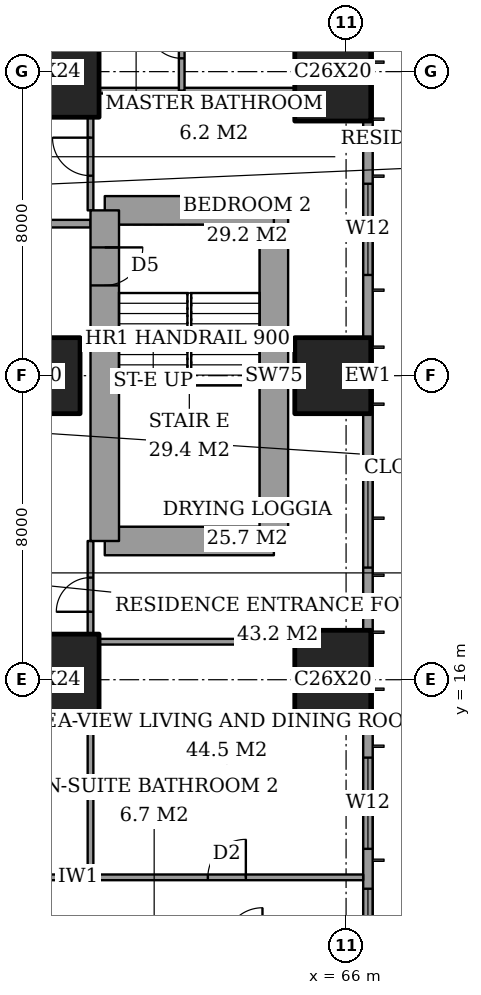
"""IFC4 building model, lengths in metres.
Left out: names, types, materials, properties, quantities, classifications, styles, units other than length and angle.
Written with IfcOpenShell. Run it as: python <this file> out.ifc"""

import sys

from ifc_helpers import new_model, si_unit, direction, frame, frame_2d, origin, origin_2d, place, context, subcontext, project, spatial, rectangle, extrude, element, fill, save


model = new_model("IFC4")
c1 = context("Model", 3, precision=1e-05, world=origin(), true_north=direction((0.0, 1.0)))
c2 = subcontext(c1, "Body", "Model", "MODEL_VIEW")
j1 = project(units=[si_unit("LENGTHUNIT", "METRE"), si_unit("PLANEANGLEUNIT", "RADIAN")], contexts=[c1])
p1 = place(None, origin())
s1 = spatial("IfcSite", under=j1, at=p1, CompositionType="ELEMENT")
p2 = place(p1, origin())
s2 = spatial("IfcBuilding", under=s1, at=p2, CompositionType="ELEMENT")
p3 = place(p2, frame((0.0, 0.0, 125.0)))
s3 = spatial("IfcBuildingStorey", under=s2, at=p3, CompositionType="ELEMENT", Elevation=125.0)
p4 = place(p3, frame((58.0, 16.0, 0.0), z_axis=(0.0, 0.0, 1.0), x_axis=(1.0, 0.0, 0.0)))
e1 = element("IfcColumn", 1, at=p4, inside=s3, PredefinedType="COLUMN", context=c2, shape_type="SweptSolid", body=[
    extrude(rectangle(XDim=3.0, YDim=2.4, at=origin_2d()), origin(), (0.0, 0.0, 1.0), 3.6),
])
p5 = place(p3, frame((58.0, 24.0, 0.0), z_axis=(0.0, 0.0, 1.0), x_axis=(1.0, 0.0, 0.0)))
e2 = element("IfcColumn", 2, at=p5, inside=s3, PredefinedType="COLUMN", context=c2, shape_type="SweptSolid", body=[
    extrude(rectangle(XDim=2.0, YDim=2.0, at=origin_2d()), origin(), (0.0, 0.0, 1.0), 3.6),
])
p6 = place(p3, frame((58.0, 32.0, 0.0), z_axis=(0.0, 0.0, 1.0), x_axis=(1.0, 0.0, 0.0)))
e3 = element("IfcColumn", 3, at=p6, inside=s3, PredefinedType="COLUMN", context=c2, shape_type="SweptSolid", body=[
    extrude(rectangle(XDim=3.0, YDim=2.4, at=origin_2d()), origin(), (0.0, 0.0, 1.0), 3.6),
])
p7 = place(p3, frame((65.65, 16.0, 0.0), z_axis=(0.0, 0.0, 1.0), x_axis=(0.0, 1.0, 0.0)))
e4 = element("IfcColumn", 4, at=p7, inside=s3, PredefinedType="COLUMN", context=c2, shape_type="SweptSolid", body=[
    extrude(rectangle(XDim=2.6, YDim=2.0, at=origin_2d()), origin(), (0.0, 0.0, 1.0), 3.6),
])
p8 = place(p3, frame((65.65, 24.0, 0.0), z_axis=(0.0, 0.0, 1.0), x_axis=(1.0, 0.0, 0.0)))
e5 = element("IfcColumn", 5, at=p8, inside=s3, PredefinedType="COLUMN", context=c2, shape_type="SweptSolid", body=[
    extrude(rectangle(XDim=2.0, YDim=2.0, at=origin_2d()), origin(), (0.0, 0.0, 1.0), 3.6),
])
p9 = place(p3, frame((65.65, 32.0, 0.0), z_axis=(0.0, 0.0, 1.0), x_axis=(0.0, 1.0, 0.0)))
e6 = element("IfcColumn", 6, at=p9, inside=s3, PredefinedType="COLUMN", context=c2, shape_type="SweptSolid", body=[
    extrude(rectangle(XDim=2.6, YDim=2.0, at=origin_2d()), origin(), (0.0, 0.0, 1.0), 3.6),
])
p10 = place(p3, frame((59.65, 19.65, 0.0), z_axis=(0.0, 0.0, 1.0), x_axis=(1.0, 0.0, 0.0)))
e7 = element("IfcWall", 7, at=p10, inside=s3, PredefinedType="SHEAR", context=c2, shape_type="SweptSolid", body=[
    extrude(rectangle(XDim=4.45, YDim=0.75, at=frame_2d((2.225, 0.0))), origin(), (0.0, 0.0, 1.0), 3.6),
])
p11 = place(p3, frame((64.1, 19.65, 0.0), z_axis=(0.0, 0.0, 1.0), x_axis=(0.0, 1.0, 0.0)))
e8 = element("IfcWall", 8, at=p11, inside=s3, PredefinedType="SHEAR", context=c2, shape_type="SweptSolid", body=[
    extrude(rectangle(XDim=8.7, YDim=0.75, at=frame_2d((4.35, 0.0))), origin(), (0.0, 0.0, 1.0), 3.6),
])
p12 = place(p3, frame((64.1, 28.35, 0.0), z_axis=(0.0, 0.0, 1.0), x_axis=(-1.0, 0.0, 0.0)))
e9 = element("IfcWall", 9, at=p12, inside=s3, PredefinedType="SHEAR", context=c2, shape_type="SweptSolid", body=[
    extrude(rectangle(XDim=4.45, YDim=0.75, at=frame_2d((2.225, 0.0))), origin(), (0.0, 0.0, 1.0), 3.6),
])
p13 = place(p3, frame((59.65, 28.35, 0.0), z_axis=(0.0, 0.0, 1.0), x_axis=(0.0, -1.0, 0.0)))
e10 = element("IfcWall", 10, at=p13, inside=s3, PredefinedType="SHEAR", context=c2, shape_type="SweptSolid", body=[
    extrude(rectangle(XDim=8.7, YDim=0.75, at=frame_2d((4.35, 0.0))), origin(), (0.0, 0.0, 1.0), 3.6),
])
p14 = place(p13, frame((0.975, 0.0, 0.0)))
e11 = element("IfcOpeningElement", 11, at=p14, cuts=e10, PredefinedType="OPENING", context=c2, shape_type="SweptSolid", body=[
    extrude(rectangle(XDim=1.0, YDim=2.1, at=frame_2d((0.5, 1.05))), frame((0.0, 0.385, 0.0), z_axis=(0.0, -1.0, 0.0), x_axis=(1.0, 0.0, 0.0)), (0.0, 0.0, 1.0), 0.77),
])
p15 = place(p3, frame((66.575, 3.175, 0.0), z_axis=(0.0, 0.0, 1.0), x_axis=(0.0, 1.0, 0.0)))
e12 = element("IfcWall", 12, at=p15, inside=s3, PredefinedType="SOLIDWALL", context=c2, shape_type="SweptSolid", body=[
    extrude(rectangle(XDim=41.65, YDim=0.25, at=frame_2d((20.825, 0.0))), origin(), (0.0, 0.0, 1.0), 3.6),
])
p16 = place(p15, frame((0.775, 0.0, 0.4)))
e13 = element("IfcOpeningElement", 13, at=p16, cuts=e12, PredefinedType="OPENING", context=c2, shape_type="SweptSolid", body=[
    extrude(rectangle(XDim=2.4, YDim=2.2, at=frame_2d((1.2, 1.1))), frame((0.0, 0.135, 0.0), z_axis=(0.0, -1.0, 0.0), x_axis=(1.0, 0.0, 0.0)), (0.0, 0.0, 1.0), 0.27),
])
p17 = place(p15, frame((6.125, 0.0, 0.4)))
e14 = element("IfcOpeningElement", 14, at=p17, cuts=e12, PredefinedType="OPENING", context=c2, shape_type="SweptSolid", body=[
    extrude(rectangle(XDim=1.2, YDim=2.2, at=frame_2d((0.6, 1.1))), frame((0.0, 0.135, 0.0), z_axis=(0.0, -1.0, 0.0), x_axis=(1.0, 0.0, 0.0)), (0.0, 0.0, 1.0), 0.27),
])
p18 = place(p15, frame((8.375, 0.0, 0.4)))
e15 = element("IfcOpeningElement", 15, at=p18, cuts=e12, PredefinedType="OPENING", context=c2, shape_type="SweptSolid", body=[
    extrude(rectangle(XDim=2.4, YDim=2.2, at=frame_2d((1.2, 1.1))), frame((0.0, 0.135, 0.0), z_axis=(0.0, -1.0, 0.0), x_axis=(1.0, 0.0, 0.0)), (0.0, 0.0, 1.0), 0.27),
])
p19 = place(p15, frame((15.775, 0.0, 0.4)))
e16 = element("IfcOpeningElement", 16, at=p19, cuts=e12, PredefinedType="OPENING", context=c2, shape_type="SweptSolid", body=[
    extrude(rectangle(XDim=2.4, YDim=2.2, at=frame_2d((1.2, 1.1))), frame((0.0, 0.135, 0.0), z_axis=(0.0, -1.0, 0.0), x_axis=(1.0, 0.0, 0.0)), (0.0, 0.0, 1.0), 0.27),
])
p20 = place(p15, frame((23.475, 0.0, 0.4)))
e17 = element("IfcOpeningElement", 17, at=p20, cuts=e12, PredefinedType="OPENING", context=c2, shape_type="SweptSolid", body=[
    extrude(rectangle(XDim=2.4, YDim=2.2, at=frame_2d((1.2, 1.1))), frame((0.0, 0.135, 0.0), z_axis=(0.0, -1.0, 0.0), x_axis=(1.0, 0.0, 0.0)), (0.0, 0.0, 1.0), 0.27),
])
p21 = place(p15, frame((30.975, 0.0, 0.4)))
e18 = element("IfcOpeningElement", 18, at=p21, cuts=e12, PredefinedType="OPENING", context=c2, shape_type="SweptSolid", body=[
    extrude(rectangle(XDim=2.4, YDim=2.2, at=frame_2d((1.2, 1.1))), frame((0.0, 0.135, 0.0), z_axis=(0.0, -1.0, 0.0), x_axis=(1.0, 0.0, 0.0)), (0.0, 0.0, 1.0), 0.27),
])
p22 = place(p15, frame((34.5, 0.0, 0.4)))
e19 = element("IfcOpeningElement", 19, at=p22, cuts=e12, PredefinedType="OPENING", context=c2, shape_type="SweptSolid", body=[
    extrude(rectangle(XDim=1.2, YDim=2.2, at=frame_2d((0.6, 1.1))), frame((0.0, 0.135, 0.0), z_axis=(0.0, -1.0, 0.0), x_axis=(1.0, 0.0, 0.0)), (0.0, 0.0, 1.0), 0.27),
])
p23 = place(p15, frame((38.475, 0.0, 0.4)))
e20 = element("IfcOpeningElement", 20, at=p23, cuts=e12, PredefinedType="OPENING", context=c2, shape_type="SweptSolid", body=[
    extrude(rectangle(XDim=2.4, YDim=2.2, at=frame_2d((1.2, 1.1))), frame((0.0, 0.135, 0.0), z_axis=(0.0, -1.0, 0.0), x_axis=(1.0, 0.0, 0.0)), (0.0, 0.0, 1.0), 0.27),
])
p24 = place(p3, frame((41.439, 10.8, 0.0), z_axis=(0.0, 0.0, 1.0), x_axis=(1.0, 0.0, 0.0)))
e21 = element("IfcWall", 21, at=p24, inside=s3, PredefinedType="PARTITIONING", context=c2, shape_type="SweptSolid", body=[
    extrude(rectangle(XDim=25.011, YDim=0.15, at=frame_2d((12.505, 0.0))), origin(), (0.0, 0.0, 1.0), 3.35),
])
p25 = place(p24, frame((12.361, 0.0, 0.0)))
e22 = element("IfcOpeningElement", 22, at=p25, cuts=e21, PredefinedType="OPENING", context=c2, shape_type="SweptSolid", body=[
    extrude(rectangle(XDim=1.0, YDim=2.1, at=frame_2d((0.5, 1.05))), frame((0.0, 0.085, 0.0), z_axis=(0.0, -1.0, 0.0), x_axis=(1.0, 0.0, 0.0)), (0.0, 0.0, 1.0), 0.17),
])
p26 = place(p24, frame((20.924, 0.0, 0.0)))
e23 = element("IfcOpeningElement", 23, at=p26, cuts=e21, PredefinedType="OPENING", context=c2, shape_type="SweptSolid", body=[
    extrude(rectangle(XDim=1.0, YDim=2.1, at=frame_2d((0.5, 1.05))), frame((0.0, 0.085, 0.0), z_axis=(0.0, -1.0, 0.0), x_axis=(1.0, 0.0, 0.0)), (0.0, 0.0, 1.0), 0.17),
])
p27 = place(p24, frame((15.448, 0.0, 0.0)))
e24 = element("IfcOpeningElement", 24, at=p27, cuts=e21, PredefinedType="OPENING", context=c2, shape_type="SweptSolid", body=[
    extrude(rectangle(XDim=0.9, YDim=2.1, at=frame_2d((0.45, 1.05))), frame((0.0, 0.085, 0.0), z_axis=(0.0, -1.0, 0.0), x_axis=(1.0, 0.0, 0.0)), (0.0, 0.0, 1.0), 0.17),
])
p28 = place(p24, frame((9.961, 0.0, 0.0)))
e25 = element("IfcOpeningElement", 25, at=p28, cuts=e21, PredefinedType="OPENING", context=c2, shape_type="SweptSolid", body=[
    extrude(rectangle(XDim=1.0, YDim=2.1, at=frame_2d((0.5, 1.05))), frame((0.0, 0.085, 0.0), z_axis=(0.0, -1.0, 0.0), x_axis=(1.0, 0.0, 0.0)), (0.0, 0.0, 1.0), 0.17),
])
p29 = place(p24, frame((7.361, 0.0, 0.0)))
e26 = element("IfcOpeningElement", 26, at=p29, cuts=e21, PredefinedType="OPENING", context=c2, shape_type="SweptSolid", body=[
    extrude(rectangle(XDim=1.0, YDim=2.1, at=frame_2d((0.5, 1.05))), frame((0.0, 0.085, 0.0), z_axis=(0.0, -1.0, 0.0), x_axis=(1.0, 0.0, 0.0)), (0.0, 0.0, 1.0), 0.17),
])
p30 = place(p24, frame((2.836, 0.0, 0.0)))
e27 = element("IfcOpeningElement", 27, at=p30, cuts=e21, PredefinedType="OPENING", context=c2, shape_type="SweptSolid", body=[
    extrude(rectangle(XDim=1.0, YDim=2.1, at=frame_2d((0.5, 1.05))), frame((0.0, 0.085, 0.0), z_axis=(0.0, -1.0, 0.0), x_axis=(1.0, 0.0, 0.0)), (0.0, 0.0, 1.0), 0.17),
])
p31 = place(p3, frame((59.5, 17.0, 0.0), z_axis=(0.0, 0.0, 1.0), x_axis=(1.0, 0.0, 0.0)))
e28 = element("IfcWall", 28, at=p31, inside=s3, PredefinedType="PARTITIONING", context=c2, shape_type="SweptSolid", body=[
    extrude(rectangle(XDim=5.15, YDim=0.15, at=frame_2d((2.575, 0.0))), origin(), (0.0, 0.0, 1.0), 3.35),
])
p32 = place(p3, frame((42.0, 28.0, 0.0), z_axis=(0.0, 0.0, 1.0), x_axis=(1.0, 0.0, 0.0)))
e29 = element("IfcWall", 29, at=p32, inside=s3, PredefinedType="PARTITIONING", context=c2, shape_type="SweptSolid", body=[
    extrude(rectangle(XDim=17.275, YDim=0.2, at=frame_2d((8.637, 0.0))), origin(), (0.0, 0.0, 1.0), 3.35),
])
p33 = place(p32, frame((9.5, 0.0, 0.0)))
e30 = element("IfcOpeningElement", 30, at=p33, cuts=e29, PredefinedType="OPENING", context=c2, shape_type="SweptSolid", body=[
    extrude(rectangle(XDim=1.2, YDim=2.4, at=frame_2d((0.6, 1.2))), frame((0.0, 0.11, 0.0), z_axis=(0.0, -1.0, 0.0), x_axis=(1.0, 0.0, 0.0)), (0.0, 0.0, 1.0), 0.22),
])
p34 = place(p3, frame((59.5, 31.5, 0.0), z_axis=(0.0, 0.0, 1.0), x_axis=(1.0, 0.0, 0.0)))
e31 = element("IfcWall", 31, at=p34, inside=s3, PredefinedType="PARTITIONING", context=c2, shape_type="SweptSolid", body=[
    extrude(rectangle(XDim=5.15, YDim=0.15, at=frame_2d((2.575, 0.0))), origin(), (0.0, 0.0, 1.0), 3.35),
])
p35 = place(p3, frame((59.275, 10.8, 0.0), z_axis=(0.0, 0.0, 1.0), x_axis=(0.0, 1.0, 0.0)))
e32 = element("IfcWall", 32, at=p35, inside=s3, PredefinedType="PARTITIONING", context=c2, shape_type="SweptSolid", body=[
    extrude(rectangle(XDim=4.0, YDim=0.15, at=frame_2d((2.0, 0.0))), origin(), (0.0, 0.0, 1.0), 3.35),
])
p36 = place(p3, frame((59.275, 17.2, 0.0), z_axis=(0.0, 0.0, 1.0), x_axis=(0.0, 1.0, 0.0)))
e33 = element("IfcWall", 33, at=p36, inside=s3, PredefinedType="PARTITIONING", context=c2, shape_type="SweptSolid", body=[
    extrude(rectangle(XDim=2.45, YDim=0.15, at=frame_2d((1.225, 0.0))), origin(), (0.0, 0.0, 1.0), 3.35),
])
p37 = place(p36, frame((0.587, 0.0, 0.0)))
e34 = element("IfcOpeningElement", 34, at=p37, cuts=e33, PredefinedType="OPENING", context=c2, shape_type="SweptSolid", body=[
    extrude(rectangle(XDim=0.9, YDim=2.1, at=frame_2d((0.45, 1.05))), frame((0.0, 0.085, 0.0), z_axis=(0.0, -1.0, 0.0), x_axis=(1.0, 0.0, 0.0)), (0.0, 0.0, 1.0), 0.17),
])
p38 = place(p3, frame((59.275, 28.35, 0.0), z_axis=(0.0, 0.0, 1.0), x_axis=(0.0, 1.0, 0.0)))
e35 = element("IfcWall", 35, at=p38, inside=s3, PredefinedType="PARTITIONING", context=c2, shape_type="SweptSolid", body=[
    extrude(rectangle(XDim=2.45, YDim=0.15, at=frame_2d((1.225, 0.0))), origin(), (0.0, 0.0, 1.0), 3.35),
])
p39 = place(p38, frame((0.913, 0.0, 0.0)))
e36 = element("IfcOpeningElement", 36, at=p39, cuts=e35, PredefinedType="OPENING", context=c2, shape_type="SweptSolid", body=[
    extrude(rectangle(XDim=1.0, YDim=2.1, at=frame_2d((0.5, 1.05))), frame((0.0, 0.085, 0.0), z_axis=(0.0, -1.0, 0.0), x_axis=(1.0, 0.0, 0.0)), (0.0, 0.0, 1.0), 0.17),
])
p40 = place(p3, frame((61.675, 31.5, 0.0), z_axis=(0.0, 0.0, 1.0), x_axis=(0.0, 1.0, 0.0)))
e37 = element("IfcWall", 37, at=p40, inside=s3, PredefinedType="PARTITIONING", context=c2, shape_type="SweptSolid", body=[
    extrude(rectangle(XDim=2.6, YDim=0.15, at=frame_2d((1.3, 0.0))), origin(), (0.0, 0.0, 1.0), 3.35),
])
p41 = place(p40, frame((0.85, 0.0, 0.0)))
e38 = element("IfcOpeningElement", 38, at=p41, cuts=e37, PredefinedType="OPENING", context=c2, shape_type="SweptSolid", body=[
    extrude(rectangle(XDim=0.9, YDim=2.1, at=frame_2d((0.45, 1.05))), frame((0.0, 0.085, 0.0), z_axis=(0.0, -1.0, 0.0), x_axis=(1.0, 0.0, 0.0)), (0.0, 0.0, 1.0), 0.17),
])
p42 = place(p17, origin())
e39 = element("IfcWindow", 39, at=p42, inside=s3, PartitioningType="SINGLE_PANEL", PredefinedType="WINDOW", context=c2, shape_type="SweptSolid", body=[
    extrude(rectangle(XDim=1.2, YDim=2.2, at=frame_2d((0.6, 1.1))), frame((0.0, 0.03, 0.0), z_axis=(0.0, -1.0, 0.0), x_axis=(1.0, 0.0, 0.0)), (0.0, 0.0, 1.0), 0.06),
])
fill(e14, e39)
p43 = place(p18, origin())
e40 = element("IfcWindow", 40, at=p43, inside=s3, PartitioningType="SINGLE_PANEL", PredefinedType="WINDOW", context=c2, shape_type="SweptSolid", body=[
    extrude(rectangle(XDim=2.4, YDim=2.2, at=frame_2d((1.2, 1.1))), frame((0.0, 0.03, 0.0), z_axis=(0.0, -1.0, 0.0), x_axis=(1.0, 0.0, 0.0)), (0.0, 0.0, 1.0), 0.06),
])
fill(e15, e40)
p44 = place(p19, origin())
e41 = element("IfcWindow", 41, at=p44, inside=s3, PartitioningType="SINGLE_PANEL", PredefinedType="WINDOW", context=c2, shape_type="SweptSolid", body=[
    extrude(rectangle(XDim=2.4, YDim=2.2, at=frame_2d((1.2, 1.1))), frame((0.0, 0.03, 0.0), z_axis=(0.0, -1.0, 0.0), x_axis=(1.0, 0.0, 0.0)), (0.0, 0.0, 1.0), 0.06),
])
fill(e16, e41)
p45 = place(p20, origin())
e42 = element("IfcWindow", 42, at=p45, inside=s3, PartitioningType="SINGLE_PANEL", PredefinedType="WINDOW", context=c2, shape_type="SweptSolid", body=[
    extrude(rectangle(XDim=2.4, YDim=2.2, at=frame_2d((1.2, 1.1))), frame((0.0, 0.03, 0.0), z_axis=(0.0, -1.0, 0.0), x_axis=(1.0, 0.0, 0.0)), (0.0, 0.0, 1.0), 0.06),
])
fill(e17, e42)
p46 = place(p26, origin())
e43 = element("IfcDoor", 43, at=p46, inside=s3, OperationType="SINGLE_SWING_LEFT", PredefinedType="DOOR", context=c2, shape_type="SweptSolid", body=[
    extrude(rectangle(XDim=1.0, YDim=2.1, at=frame_2d((0.5, 1.05))), frame((0.0, 0.025, 0.0), z_axis=(0.0, -1.0, 0.0), x_axis=(1.0, 0.0, 0.0)), (0.0, 0.0, 1.0), 0.05),
])
fill(e23, e43)
p47 = place(p37, origin())
e44 = element("IfcDoor", 44, at=p47, inside=s3, OperationType="SINGLE_SWING_RIGHT", PredefinedType="DOOR", context=c2, shape_type="SweptSolid", body=[
    extrude(rectangle(XDim=0.9, YDim=2.1, at=frame_2d((0.45, 1.05))), frame((0.0, 0.025, 0.0), z_axis=(0.0, -1.0, 0.0), x_axis=(1.0, 0.0, 0.0)), (0.0, 0.0, 1.0), 0.05),
])
fill(e34, e44)
p48 = place(p41, origin())
e45 = element("IfcDoor", 45, at=p48, inside=s3, OperationType="SINGLE_SWING_LEFT", PredefinedType="DOOR", context=c2, shape_type="SweptSolid", body=[
    extrude(rectangle(XDim=0.9, YDim=2.1, at=frame_2d((0.45, 1.05))), frame((0.0, 0.025, 0.0), z_axis=(0.0, -1.0, 0.0), x_axis=(1.0, 0.0, 0.0)), (0.0, 0.0, 1.0), 0.05),
])
fill(e38, e45)
p49 = place(p39, origin())
e46 = element("IfcDoor", 46, at=p49, inside=s3, OperationType="SINGLE_SWING_LEFT", PredefinedType="DOOR", context=c2, shape_type="SweptSolid", body=[
    extrude(rectangle(XDim=1.0, YDim=2.1, at=frame_2d((0.5, 1.05))), frame((0.0, 0.025, 0.0), z_axis=(0.0, -1.0, 0.0), x_axis=(1.0, 0.0, 0.0)), (0.0, 0.0, 1.0), 0.05),
])
fill(e36, e46)
p50 = place(p14, origin())
e47 = element("IfcDoor", 47, at=p50, inside=s3, OperationType="SINGLE_SWING_RIGHT", PredefinedType="DOOR", context=c2, shape_type="SweptSolid", body=[
    extrude(rectangle(XDim=1.0, YDim=2.1, at=frame_2d((0.5, 1.05))), frame((0.0, 0.025, 0.0), z_axis=(0.0, -1.0, 0.0), x_axis=(1.0, 0.0, 0.0)), (0.0, 0.0, 1.0), 0.05),
])
fill(e11, e47)
save(model, sys.argv[1])
